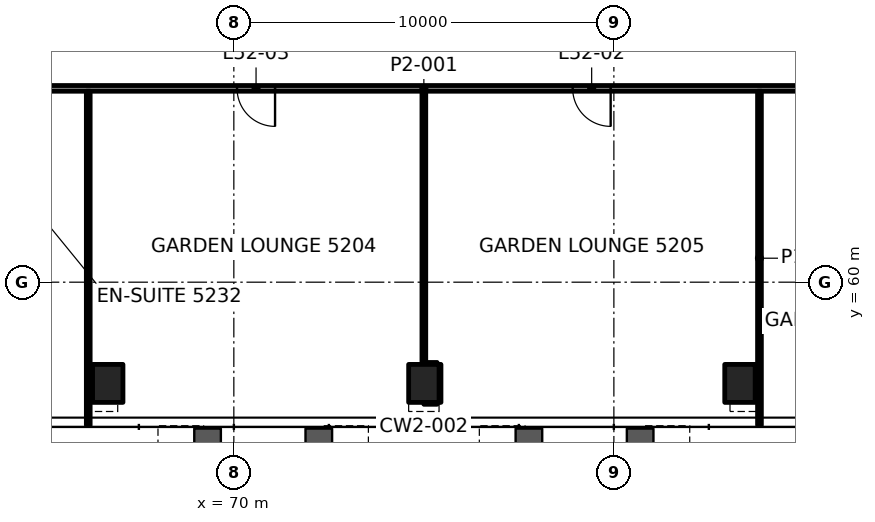
"""IFC4 building model, lengths in metres.
Left out: names, types, materials, properties, quantities, classifications, styles, units other than length and angle.
Written with IfcOpenShell. Run it as: python <this file> out.ifc"""

import sys

from ifc_helpers import new_model, si_unit, direction, frame, frame_2d, origin, origin_2d, place, context, subcontext, project, spatial, rectangle, hollow_rectangle, extrude, element, fill, save


model = new_model("IFC4")
c1 = context("Model", 3, precision=1e-05, world=origin(), true_north=direction((0.0, 1.0)))
c2 = subcontext(c1, "Body", "Model", "MODEL_VIEW")
j1 = project(units=[si_unit("LENGTHUNIT", "METRE"), si_unit("PLANEANGLEUNIT", "RADIAN")], contexts=[c1])
p1 = place(None, origin())
s1 = spatial("IfcSite", under=j1, at=p1, CompositionType="ELEMENT")
p2 = place(p1, origin())
s2 = spatial("IfcBuilding", under=s1, at=p2, CompositionType="ELEMENT")
p3 = place(p2, frame((0.0, 0.0, 222.1)))
s3 = spatial("IfcBuildingStorey", under=s2, at=p3, CompositionType="ELEMENT", Elevation=222.1)
for number, where, z_axis, x_axis in (
    (1, (66.682, 57.337, -0.0), (0.0, 0.0, 1.0), (1.0, 0.0, 0.0)),
    (2, (75.0, 57.337, -0.0), (0.0, 0.0, 1.0), (1.0, 0.0, 0.0)),
    (3, (83.318, 57.337, -0.0), (0.0, 0.0, 1.0), (1.0, 0.0, 0.0)),
):
    element("IfcColumn", number, at=place(p3, frame(where, z_axis=z_axis, x_axis=x_axis)), inside=s3, PredefinedType="COLUMN", context=c2, shape_type="SweptSolid", body=[
        extrude(hollow_rectangle(XDim=0.8, YDim=1.0, WallThickness=0.05, at=origin_2d()), origin(), (0.0, 0.0, 1.0), 3.9),
    ])
p4 = place(p3, frame((75.0, 56.837, 0.0), z_axis=(0.0, 0.0, 1.0), x_axis=(1.0, 0.0, 0.0)))
e4 = element("IfcWall", 4, at=p4, inside=s3, PredefinedType="PARTITIONING", context=c2, shape_type="SweptSolid", body=[
    extrude(rectangle(XDim=0.35, YDim=0.1, at=frame_2d((0.175, 0.0))), origin(), (0.0, 0.0, 1.0), 3.1),
])
p5 = place(p3, frame((75.05, 57.837, 0.0), z_axis=(0.0, 0.0, 1.0), x_axis=(1.0, 0.0, 0.0)))
e5 = element("IfcWall", 5, at=p5, inside=s3, PredefinedType="PARTITIONING", context=c2, shape_type="SweptSolid", body=[
    extrude(rectangle(XDim=0.3, YDim=0.1, at=frame_2d((0.15, 0.0))), origin(), (0.0, 0.0, 1.0), 3.1),
])
p6 = place(p3, frame((87.899, 65.1, 0.0), z_axis=(0.0, 0.0, 1.0), x_axis=(-1.0, 0.0, 0.0)))
e6 = element("IfcWall", 6, at=p6, inside=s3, PredefinedType="PARTITIONING", context=c2, shape_type="SweptSolid", body=[
    extrude(rectangle(XDim=25.799, YDim=0.15, at=frame_2d((12.899, 0.0))), origin(), (0.0, 0.0, 1.0), 3.1),
])
p7 = place(p6, frame((1.636, 0.0, 0.0)))
e7 = element("IfcOpeningElement", 7, at=p7, cuts=e6, PredefinedType="OPENING", context=c2, shape_type="SweptSolid", body=[
    extrude(rectangle(XDim=1.0, YDim=2.1, at=frame_2d((0.5, 1.05))), frame((0.0, 0.085, 0.0), z_axis=(0.0, -1.0, 0.0), x_axis=(1.0, 0.0, 0.0)), (0.0, 0.0, 1.0), 0.17),
])
p8 = place(p6, frame((7.984, 0.0, 0.0)))
e8 = element("IfcOpeningElement", 8, at=p8, cuts=e6, PredefinedType="OPENING", context=c2, shape_type="SweptSolid", body=[
    extrude(rectangle(XDim=1.0, YDim=2.1, at=frame_2d((0.5, 1.05))), frame((0.0, 0.085, 0.0), z_axis=(0.0, -1.0, 0.0), x_axis=(1.0, 0.0, 0.0)), (0.0, 0.0, 1.0), 0.17),
])
p9 = place(p6, frame((16.815, 0.0, 0.0)))
e9 = element("IfcOpeningElement", 9, at=p9, cuts=e6, PredefinedType="OPENING", context=c2, shape_type="SweptSolid", body=[
    extrude(rectangle(XDim=1.0, YDim=2.1, at=frame_2d((0.5, 1.05))), frame((0.0, 0.085, 0.0), z_axis=(0.0, -1.0, 0.0), x_axis=(1.0, 0.0, 0.0)), (0.0, 0.0, 1.0), 0.17),
])
p10 = place(p6, frame((23.163, 0.0, 0.0)))
e10 = element("IfcOpeningElement", 10, at=p10, cuts=e6, PredefinedType="OPENING", context=c2, shape_type="SweptSolid", body=[
    extrude(rectangle(XDim=1.0, YDim=2.1, at=frame_2d((0.5, 1.05))), frame((0.0, 0.085, 0.0), z_axis=(0.0, -1.0, 0.0), x_axis=(1.0, 0.0, 0.0)), (0.0, 0.0, 1.0), 0.17),
])
p11 = place(p3, frame((83.831, 56.237, 0.0), z_axis=(0.0, 0.0, 1.0), x_axis=(0.0, 1.0, 0.0)))
e11 = element("IfcWall", 11, at=p11, inside=s3, PredefinedType="PARTITIONING", context=c2, shape_type="SweptSolid", body=[
    extrude(rectangle(XDim=8.788, YDim=0.1, at=frame_2d((4.394, 0.0))), origin(), (0.0, 0.0, 1.0), 3.022),
])
p12 = place(p3, frame((75.4, 56.837, 0.0), z_axis=(0.0, 0.0, 1.0), x_axis=(0.0, 1.0, 0.0)))
e12 = element("IfcWall", 12, at=p12, inside=s3, PredefinedType="PARTITIONING", context=c2, shape_type="SweptSolid", body=[
    extrude(rectangle(XDim=0.999, YDim=0.1, at=frame_2d((0.5, 0.0))), origin(), (0.0, 0.0, 1.0), 3.022),
])
p13 = place(p3, frame((75.0, 57.837, 0.0), z_axis=(0.0, 0.0, 1.0), x_axis=(0.0, 1.0, 0.0)))
e13 = element("IfcWall", 13, at=p13, inside=s3, PredefinedType="PARTITIONING", context=c2, shape_type="SweptSolid", body=[
    extrude(rectangle(XDim=7.188, YDim=0.1, at=frame_2d((3.594, 0.0))), origin(), (0.0, 0.0, 1.0), 3.1),
])
p14 = place(p3, frame((66.169, 56.237, 0.0), z_axis=(0.0, 0.0, 1.0), x_axis=(0.0, 1.0, 0.0)))
e14 = element("IfcWall", 14, at=p14, inside=s3, PredefinedType="PARTITIONING", context=c2, shape_type="SweptSolid", body=[
    extrude(rectangle(XDim=8.788, YDim=0.1, at=frame_2d((4.394, 0.0))), origin(), (0.0, 0.0, 1.0), 3.022),
])
p15 = place(p8, origin())
e15 = element("IfcDoor", 15, at=p15, inside=s3, OperationType="SINGLE_SWING_LEFT", PredefinedType="DOOR", context=c2, shape_type="SweptSolid", body=[
    extrude(rectangle(XDim=1.0, YDim=2.1, at=frame_2d((0.5, 1.05))), frame((0.0, 0.025, 0.0), z_axis=(0.0, -1.0, 0.0), x_axis=(1.0, 0.0, 0.0)), (0.0, 0.0, 1.0), 0.05),
])
fill(e8, e15)
p16 = place(p9, origin())
e16 = element("IfcDoor", 16, at=p16, inside=s3, OperationType="SINGLE_SWING_RIGHT", PredefinedType="DOOR", context=c2, shape_type="SweptSolid", body=[
    extrude(rectangle(XDim=1.0, YDim=2.1, at=frame_2d((0.5, 1.05))), frame((0.0, 0.025, 0.0), z_axis=(0.0, -1.0, 0.0), x_axis=(1.0, 0.0, 0.0)), (0.0, 0.0, 1.0), 0.05),
])
fill(e9, e16)
save(model, sys.argv[1])
